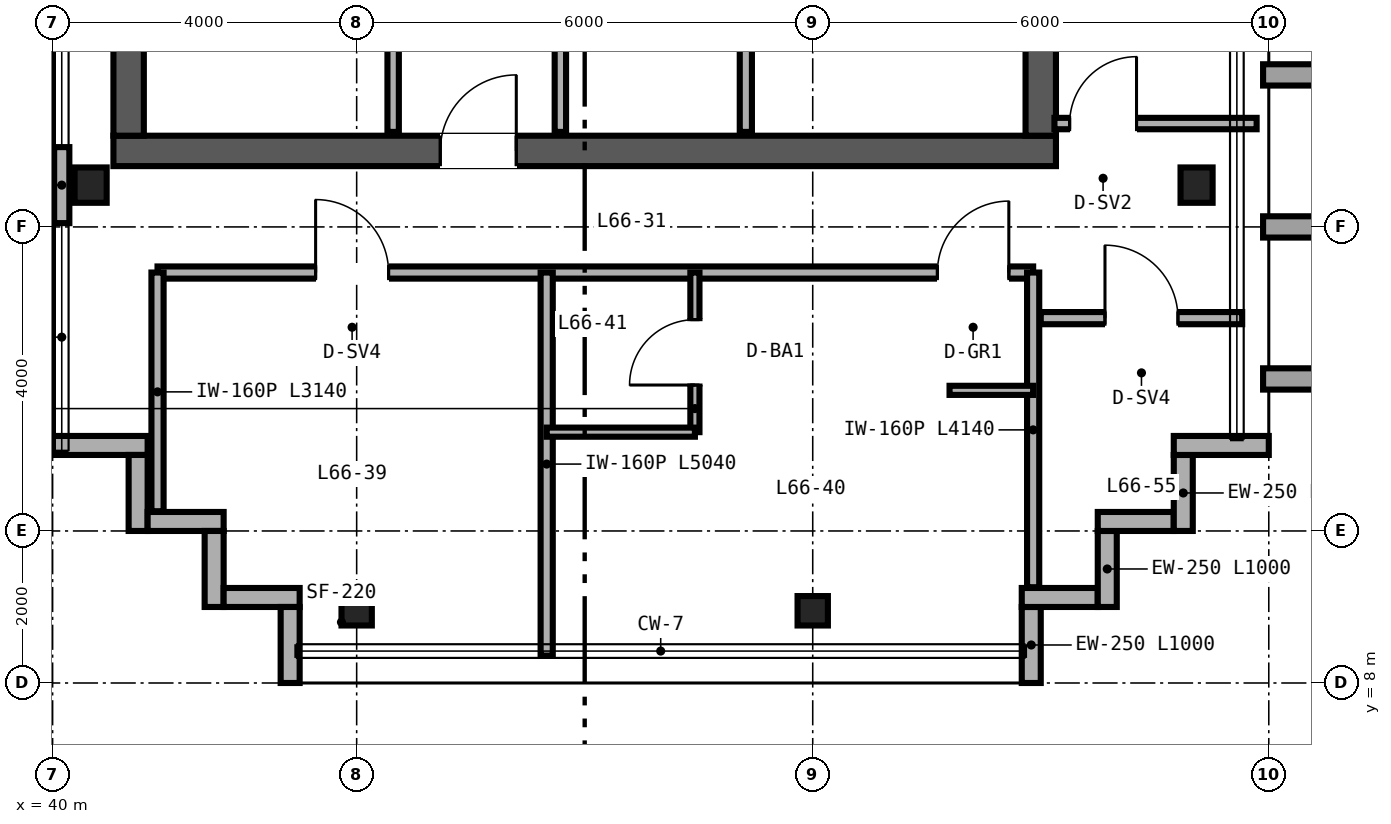
"""IFC4 building model, lengths in metres.
Left out: names, types, materials, properties, quantities, classifications, styles, units other than length and angle.
Written with IfcOpenShell. Run it as: python <this file> out.ifc"""

import sys

from ifc_helpers import new_model, si_unit, direction, frame, frame_2d, origin, origin_2d, place, context, subcontext, project, spatial, rectangle, i_section, extrude, source, transform, mapped, element, fill, save


model = new_model("IFC4")
c1 = context("Model", 3, precision=1e-05, world=origin(), true_north=direction((0.0, 1.0)))
c2 = subcontext(c1, "Body", "Model", "MODEL_VIEW")
j1 = project(units=[si_unit("LENGTHUNIT", "METRE"), si_unit("PLANEANGLEUNIT", "RADIAN")], contexts=[c1])
p1 = place(None, origin())
s1 = spatial("IfcSite", under=j1, at=p1, CompositionType="ELEMENT")
p2 = place(p1, origin())
s2 = spatial("IfcBuilding", under=s1, at=p2, CompositionType="ELEMENT")
p3 = place(p2, frame((0.0, 0.0, 261.6)))
s3 = spatial("IfcBuildingStorey", under=s2, at=p3, CompositionType="ELEMENT", Elevation=261.6)
p4 = place(p3, frame((40.8, 15.0, 0.0), z_axis=(0.0, 0.0, 1.0), x_axis=(1.0, 0.0, 0.0)))
e1 = element("IfcWall", 1, at=p4, inside=s3, PredefinedType="SHEAR", context=c2, shape_type="SweptSolid", body=[
    extrude(rectangle(XDim=12.4, YDim=0.4, at=frame_2d((6.2, 0.0))), origin(), (0.0, 0.0, 1.0), 3.38),
])
p5 = place(p4, frame((4.3, 0.0, 0.0)))
e2 = element("IfcOpeningElement", 2, at=p5, cuts=e1, PredefinedType="OPENING", context=c2, shape_type="SweptSolid", body=[
    extrude(rectangle(XDim=1.0, YDim=2.15, at=frame_2d((0.5, 1.075))), frame((0.0, 0.21, 0.0), z_axis=(0.0, -1.0, 0.0), x_axis=(1.0, 0.0, 0.0)), (0.0, 0.0, 1.0), 0.42),
])
for number, where, z_axis, x_axis in (
    (3, (41.0, 15.2, 0.0), (0.0, 0.0, 1.0), (0.0, 1.0, 0.0)),
    (4, (53.0, 15.2, 0.0), (0.0, 0.0, 1.0), (0.0, 1.0, 0.0)),
):
    element("IfcWall", number, at=place(p3, frame(where, z_axis=z_axis, x_axis=x_axis)), inside=s3, PredefinedType="SHEAR", context=c2, shape_type="SweptSolid", body=[
        extrude(rectangle(XDim=21.6, YDim=0.4, at=frame_2d((10.8, 0.0))), origin(), (0.0, 0.0, 1.0), 3.38),
    ])
m1 = source(origin(), c2, "Body", "SweptSolid", [
    extrude(i_section(OverallWidth=0.422, OverallDepth=0.465, WebThickness=0.045, FlangeThickness=0.073, FilletRadius=0.025, at=origin_2d()), origin(), (0.0, 0.0, 1.0), 3.38),
])
for number, where, z_axis, x_axis in (
    (5, (40.5, 14.55, 0.0), (0.0, 0.0, 1.0), (1.0, 0.0, 0.0)),
    (6, (55.05, 14.55, 0.0), (0.0, 0.0, 1.0), (1.0, 0.0, 0.0)),
):
    element("IfcColumn", number, at=place(p3, frame(where, z_axis=z_axis, x_axis=x_axis)), inside=s3, PredefinedType="COLUMN", context=c2, shape_type="MappedRepresentation", body=[
        mapped(m1, transform((0.0, 0.0, 0.0), scale=1.0)),
    ])
m2 = source(origin(), c2, "Body", "SweptSolid", [
    extrude(i_section(OverallWidth=0.399, OverallDepth=0.387, WebThickness=0.021, FlangeThickness=0.033, FilletRadius=0.025, at=origin_2d()), origin(), (0.0, 0.0, 1.0), 3.38),
])
for number, where, z_axis, x_axis in (
    (7, (44.0, 8.95, 0.0), (0.0, 0.0, 1.0), (1.0, 0.0, 0.0)),
    (8, (50.0, 8.95, 0.0), (0.0, 0.0, 1.0), (1.0, 0.0, 0.0)),
):
    element("IfcColumn", number, at=place(p3, frame(where, z_axis=z_axis, x_axis=x_axis)), inside=s3, PredefinedType="COLUMN", context=c2, shape_type="MappedRepresentation", body=[
        mapped(m2, transform((0.0, 0.0, 0.0), scale=1.0)),
    ])
for number, where, z_axis, x_axis in (
    (9, (52.875, 8.0, 0.0), (0.0, 0.0, 1.0), (0.0, 1.0, 0.0)),
    (10, (52.75, 9.125, 0.0), (0.0, 0.0, 1.0), (1.0, 0.0, 0.0)),
    (11, (53.875, 9.0, 0.0), (0.0, 0.0, 1.0), (0.0, 1.0, 0.0)),
    (12, (53.75, 10.125, 0.0), (0.0, 0.0, 1.0), (1.0, 0.0, 0.0)),
    (13, (54.875, 10.0, 0.0), (0.0, 0.0, 1.0), (0.0, 1.0, 0.0)),
):
    element("IfcWall", number, at=place(p3, frame(where, z_axis=z_axis, x_axis=x_axis)), inside=s3, PredefinedType="SOLIDWALL", context=c2, shape_type="SweptSolid", body=[
        extrude(rectangle(XDim=1.0, YDim=0.25, at=frame_2d((0.5, 0.0))), origin(), (0.0, 0.0, 1.0), 3.38),
    ])
for number, where, z_axis, x_axis in (
    (14, (54.75, 11.125, 0.0), (0.0, 0.0, 1.0), (1.0, 0.0, 0.0)),
    (15, (40.0, 11.125, 0.0), (0.0, 0.0, 1.0), (1.0, 0.0, 0.0)),
):
    element("IfcWall", number, at=place(p3, frame(where, z_axis=z_axis, x_axis=x_axis)), inside=s3, PredefinedType="SOLIDWALL", context=c2, shape_type="SweptSolid", body=[
        extrude(rectangle(XDim=1.25, YDim=0.25, at=frame_2d((0.625, 0.0))), origin(), (0.0, 0.0, 1.0), 3.38),
    ])
for number, where, z_axis, x_axis in (
    (16, (41.125, 11.0, 0.0), (0.0, 0.0, 1.0), (0.0, -1.0, 0.0)),
    (17, (41.25, 10.125, 0.0), (0.0, 0.0, 1.0), (1.0, 0.0, 0.0)),
    (18, (42.125, 10.0, 0.0), (0.0, 0.0, 1.0), (0.0, -1.0, 0.0)),
    (19, (42.25, 9.125, 0.0), (0.0, 0.0, 1.0), (1.0, 0.0, 0.0)),
    (20, (43.125, 9.0, 0.0), (0.0, 0.0, 1.0), (0.0, -1.0, 0.0)),
):
    element("IfcWall", number, at=place(p3, frame(where, z_axis=z_axis, x_axis=x_axis)), inside=s3, PredefinedType="SOLIDWALL", context=c2, shape_type="SweptSolid", body=[
        extrude(rectangle(XDim=1.0, YDim=0.25, at=frame_2d((0.5, 0.0))), origin(), (0.0, 0.0, 1.0), 3.38),
    ])
p6 = place(p3, frame((40.12, 14.05, 0.0), z_axis=(0.0, 0.0, 1.0), x_axis=(0.0, 1.0, 0.0)))
e21 = element("IfcWall", 21, at=p6, inside=s3, PredefinedType="PARAPET", context=c2, shape_type="SweptSolid", body=[
    extrude(rectangle(XDim=1.0, YDim=0.2, at=frame_2d((0.5, 0.0))), origin(), (0.0, 0.0, 1.0), 3.38),
])
p7 = place(p3, frame((46.68, 15.25, 0.0), z_axis=(0.0, 0.0, 1.0), x_axis=(0.0, 1.0, 0.0)))
e22 = element("IfcWall", 22, at=p7, inside=s3, PredefinedType="PARTITIONING", context=c2, shape_type="SweptSolid", body=[
    extrude(rectangle(XDim=16.13, YDim=0.15, at=frame_2d((8.065, 0.0))), origin(), (0.0, 0.0, 1.0), 2.453),
])
p8 = place(p7, frame((3.2, 0.0, 0.0)))
e23 = element("IfcOpeningElement", 23, at=p8, cuts=e22, PredefinedType="OPENING", context=c2, shape_type="SweptSolid", body=[
    extrude(rectangle(XDim=0.88, YDim=2.15, at=frame_2d((0.44, 1.075))), frame((0.0, 0.085, 0.0), z_axis=(0.0, -1.0, 0.0), x_axis=(1.0, 0.0, 0.0)), (0.0, 0.0, 1.0), 0.17),
])
p9 = place(p7, frame((11.2, 0.0, 0.0)))
e24 = element("IfcOpeningElement", 24, at=p9, cuts=e22, PredefinedType="OPENING", context=c2, shape_type="SweptSolid", body=[
    extrude(rectangle(XDim=0.88, YDim=2.15, at=frame_2d((0.44, 1.075))), frame((0.0, 0.085, 0.0), z_axis=(0.0, -1.0, 0.0), x_axis=(1.0, 0.0, 0.0)), (0.0, 0.0, 1.0), 0.17),
])
p10 = place(p3, frame((49.12, 15.25, 0.0), z_axis=(0.0, 0.0, 1.0), x_axis=(0.0, 1.0, 0.0)))
e25 = element("IfcWall", 25, at=p10, inside=s3, PredefinedType="PARTITIONING", context=c2, shape_type="SweptSolid", body=[
    extrude(rectangle(XDim=16.13, YDim=0.16, at=frame_2d((8.065, 0.0))), origin(), (0.0, 0.0, 1.0), 2.453),
])
p11 = place(p10, frame((2.2, 0.0, 0.0)))
e26 = element("IfcOpeningElement", 26, at=p11, cuts=e25, PredefinedType="OPENING", context=c2, shape_type="SweptSolid", body=[
    extrude(rectangle(XDim=0.9, YDim=2.15, at=frame_2d((0.45, 1.075))), frame((0.0, 0.09, 0.0), z_axis=(0.0, -1.0, 0.0), x_axis=(1.0, 0.0, 0.0)), (0.0, 0.0, 1.0), 0.18),
])
p12 = place(p10, frame((8.2, 0.0, 0.0)))
e27 = element("IfcOpeningElement", 27, at=p12, cuts=e25, PredefinedType="OPENING", context=c2, shape_type="SweptSolid", body=[
    extrude(rectangle(XDim=0.9, YDim=2.15, at=frame_2d((0.45, 1.075))), frame((0.0, 0.09, 0.0), z_axis=(0.0, -1.0, 0.0), x_axis=(1.0, 0.0, 0.0)), (0.0, 0.0, 1.0), 0.18),
])
p13 = place(p10, frame((13.5, 0.0, 0.0)))
e28 = element("IfcOpeningElement", 28, at=p13, cuts=e25, PredefinedType="OPENING", context=c2, shape_type="SweptSolid", body=[
    extrude(rectangle(XDim=0.9, YDim=2.15, at=frame_2d((0.45, 1.075))), frame((0.0, 0.09, 0.0), z_axis=(0.0, -1.0, 0.0), x_axis=(1.0, 0.0, 0.0)), (0.0, 0.0, 1.0), 0.18),
])
p14 = place(p3, frame((44.48, 15.25, 0.0), z_axis=(0.0, 0.0, 1.0), x_axis=(0.0, 1.0, 0.0)))
e29 = element("IfcWall", 29, at=p14, inside=s3, PredefinedType="PARTITIONING", context=c2, shape_type="SweptSolid", body=[
    extrude(rectangle(XDim=16.13, YDim=0.15, at=frame_2d((8.065, 0.0))), origin(), (0.0, 0.0, 1.0), 2.453),
])
p15 = place(p14, frame((2.2, 0.0, 0.0)))
e30 = element("IfcOpeningElement", 30, at=p15, cuts=e29, PredefinedType="OPENING", context=c2, shape_type="SweptSolid", body=[
    extrude(rectangle(XDim=0.9, YDim=2.15, at=frame_2d((0.45, 1.075))), frame((0.0, 0.085, 0.0), z_axis=(0.0, -1.0, 0.0), x_axis=(1.0, 0.0, 0.0)), (0.0, 0.0, 1.0), 0.17),
])
p16 = place(p14, frame((10.13, 0.0, 0.0)))
e31 = element("IfcOpeningElement", 31, at=p16, cuts=e29, PredefinedType="OPENING", context=c2, shape_type="SweptSolid", body=[
    extrude(rectangle(XDim=0.9, YDim=2.15, at=frame_2d((0.45, 1.075))), frame((0.0, 0.085, 0.0), z_axis=(0.0, -1.0, 0.0), x_axis=(1.0, 0.0, 0.0)), (0.0, 0.0, 1.0), 0.17),
])
p17 = place(p3, frame((41.38, 13.4, 0.0), z_axis=(0.0, 0.0, 1.0), x_axis=(1.0, 0.0, 0.0)))
e32 = element("IfcWall", 32, at=p17, inside=s3, PredefinedType="PARTITIONING", context=c2, shape_type="SweptSolid", body=[
    extrude(rectangle(XDim=11.52, YDim=0.16, at=frame_2d((5.76, 0.0))), origin(), (0.0, 0.0, 1.0), 3.38),
])
p18 = place(p17, frame((2.08, 0.0, 0.0)))
e33 = element("IfcOpeningElement", 33, at=p18, cuts=e32, PredefinedType="OPENING", context=c2, shape_type="SweptSolid", body=[
    extrude(rectangle(XDim=0.96, YDim=2.15, at=frame_2d((0.48, 1.075))), frame((0.0, 0.09, 0.0), z_axis=(0.0, -1.0, 0.0), x_axis=(1.0, 0.0, 0.0)), (0.0, 0.0, 1.0), 0.18),
])
p19 = place(p17, frame((10.26, 0.0, 0.0)))
e34 = element("IfcOpeningElement", 34, at=p19, cuts=e32, PredefinedType="OPENING", context=c2, shape_type="SweptSolid", body=[
    extrude(rectangle(XDim=0.94, YDim=2.15, at=frame_2d((0.47, 1.075))), frame((0.0, 0.09, 0.0), z_axis=(0.0, -1.0, 0.0), x_axis=(1.0, 0.0, 0.0)), (0.0, 0.0, 1.0), 0.18),
])
p20 = place(p3, frame((41.38, 10.26, 0.0), z_axis=(0.0, 0.0, 1.0), x_axis=(0.0, 1.0, 0.0)))
e35 = element("IfcWall", 35, at=p20, inside=s3, PredefinedType="PARTITIONING", context=c2, shape_type="SweptSolid", body=[
    extrude(rectangle(XDim=3.14, YDim=0.16, at=frame_2d((1.57, 0.0))), origin(), (0.0, 0.0, 1.0), 3.38),
])
p21 = place(p3, frame((52.9, 9.26, 0.0), z_axis=(0.0, 0.0, 1.0), x_axis=(0.0, 1.0, 0.0)))
e36 = element("IfcWall", 36, at=p21, inside=s3, PredefinedType="PARTITIONING", context=c2, shape_type="SweptSolid", body=[
    extrude(rectangle(XDim=4.14, YDim=0.16, at=frame_2d((2.07, 0.0))), origin(), (0.0, 0.0, 1.0), 3.38),
])
p22 = place(p3, frame((46.5, 8.36, 0.0), z_axis=(0.0, 0.0, 1.0), x_axis=(0.0, 1.0, 0.0)))
e37 = element("IfcWall", 37, at=p22, inside=s3, PredefinedType="PARTITIONING", context=c2, shape_type="SweptSolid", body=[
    extrude(rectangle(XDim=5.04, YDim=0.16, at=frame_2d((2.52, 0.0))), origin(), (0.0, 0.0, 1.0), 2.687),
])
p23 = place(p3, frame((48.45, 11.3, 0.0), z_axis=(0.0, 0.0, 1.0), x_axis=(0.0, 1.0, 0.0)))
e38 = element("IfcWall", 38, at=p23, inside=s3, PredefinedType="PARTITIONING", context=c2, shape_type="SweptSolid", body=[
    extrude(rectangle(XDim=2.1, YDim=0.12, at=frame_2d((1.05, 0.0))), origin(), (0.0, 0.0, 1.0), 3.38),
])
p24 = place(p23, frame((0.62, 0.0, 0.0)))
e39 = element("IfcOpeningElement", 39, at=p24, cuts=e38, PredefinedType="OPENING", context=c2, shape_type="SweptSolid", body=[
    extrude(rectangle(XDim=0.86, YDim=2.1, at=frame_2d((0.43, 1.05))), frame((0.0, 0.07, 0.0), z_axis=(0.0, -1.0, 0.0), x_axis=(1.0, 0.0, 0.0)), (0.0, 0.0, 1.0), 0.14),
])
p25 = place(p3, frame((46.5, 11.3, 0.0), z_axis=(0.0, 0.0, 1.0), x_axis=(1.0, 0.0, 0.0)))
e40 = element("IfcWall", 40, at=p25, inside=s3, PredefinedType="PARTITIONING", context=c2, shape_type="SweptSolid", body=[
    extrude(rectangle(XDim=1.95, YDim=0.12, at=frame_2d((0.975, 0.0))), origin(), (0.0, 0.0, 1.0), 3.38),
])
p26 = place(p3, frame((51.8, 11.85, 0.0), z_axis=(0.0, 0.0, 1.0), x_axis=(1.0, 0.0, 0.0)))
e41 = element("IfcWall", 41, at=p26, inside=s3, PredefinedType="PARTITIONING", context=c2, shape_type="SweptSolid", body=[
    extrude(rectangle(XDim=1.1, YDim=0.12, at=frame_2d((0.55, 0.0))), origin(), (0.0, 0.0, 1.0), 3.38),
])
p27 = place(p3, frame((53.18, 15.36, 0.0), z_axis=(0.0, 0.0, 1.0), x_axis=(1.0, 0.0, 0.0)))
e42 = element("IfcWall", 42, at=p27, inside=s3, PredefinedType="PARTITIONING", context=c2, shape_type="SweptSolid", body=[
    extrude(rectangle(XDim=2.66, YDim=0.15, at=frame_2d((1.33, 0.0))), origin(), (0.0, 0.0, 1.0), 2.601),
])
p28 = place(p27, frame((0.2, 0.0, 0.0)))
e43 = element("IfcOpeningElement", 43, at=p28, cuts=e42, PredefinedType="OPENING", context=c2, shape_type="SweptSolid", body=[
    extrude(rectangle(XDim=0.88, YDim=2.15, at=frame_2d((0.44, 1.075))), frame((0.0, 0.085, 0.0), z_axis=(0.0, -1.0, 0.0), x_axis=(1.0, 0.0, 0.0)), (0.0, 0.0, 1.0), 0.17),
])
p29 = place(p3, frame((53.0, 12.8, 0.0), z_axis=(0.0, 0.0, 1.0), x_axis=(1.0, 0.0, 0.0)))
e44 = element("IfcWall", 44, at=p29, inside=s3, PredefinedType="PARTITIONING", context=c2, shape_type="SweptSolid", body=[
    extrude(rectangle(XDim=2.65, YDim=0.16, at=frame_2d((1.325, 0.0))), origin(), (0.0, 0.0, 1.0), 3.38),
])
p30 = place(p29, frame((0.845, 0.0, 0.0)))
e45 = element("IfcOpeningElement", 45, at=p30, cuts=e44, PredefinedType="OPENING", context=c2, shape_type="SweptSolid", body=[
    extrude(rectangle(XDim=0.96, YDim=2.15, at=frame_2d((0.48, 1.075))), frame((0.0, 0.09, 0.0), z_axis=(0.0, -1.0, 0.0), x_axis=(1.0, 0.0, 0.0)), (0.0, 0.0, 1.0), 0.18),
])
m3 = source(origin(), c2, "Body", "SweptSolid", [
    extrude(rectangle(XDim=1.0, YDim=2.15, at=frame_2d((0.5, 1.075))), frame((0.0, 0.025, 0.0), z_axis=(0.0, -1.0, 0.0), x_axis=(1.0, 0.0, 0.0)), (0.0, 0.0, 1.0), 0.05),
])
p31 = place(p5, origin())
e46 = element("IfcDoor", 46, at=p31, inside=s3, OperationType="SINGLE_SWING_RIGHT", PredefinedType="DOOR", context=c2, shape_type="MappedRepresentation", body=[
    mapped(m3, transform((0.0, 0.0, 0.0), scale=1.0)),
])
fill(e2, e46)
m4 = source(origin(), c2, "Body", "SweptSolid", [
    extrude(rectangle(XDim=0.86, YDim=2.1, at=frame_2d((0.43, 1.05))), frame((0.0, 0.025, 0.0), z_axis=(0.0, -1.0, 0.0), x_axis=(1.0, 0.0, 0.0)), (0.0, 0.0, 1.0), 0.05),
])
p32 = place(p24, origin())
e47 = element("IfcDoor", 47, at=p32, inside=s3, OperationType="SINGLE_SWING_LEFT", PredefinedType="DOOR", context=c2, shape_type="MappedRepresentation", body=[
    mapped(m4, transform((0.0, 0.0, 0.0), scale=1.0)),
])
fill(e39, e47)
m5 = source(origin(), c2, "Body", "SweptSolid", [
    extrude(rectangle(XDim=0.96, YDim=2.15, at=frame_2d((0.48, 1.075))), frame((0.0, 0.025, 0.0), z_axis=(0.0, -1.0, 0.0), x_axis=(1.0, 0.0, 0.0)), (0.0, 0.0, 1.0), 0.05),
])
p33 = place(p18, origin())
e48 = element("IfcDoor", 48, at=p33, inside=s3, OperationType="SINGLE_SWING_LEFT", PredefinedType="DOOR", context=c2, shape_type="MappedRepresentation", body=[
    mapped(m5, transform((0.0, 0.0, 0.0), scale=1.0)),
])
fill(e33, e48)
m6 = source(origin(), c2, "Body", "SweptSolid", [
    extrude(rectangle(XDim=0.94, YDim=2.15, at=frame_2d((0.47, 1.075))), frame((0.0, 0.025, 0.0), z_axis=(0.0, -1.0, 0.0), x_axis=(1.0, 0.0, 0.0)), (0.0, 0.0, 1.0), 0.05),
])
p34 = place(p19, origin())
e49 = element("IfcDoor", 49, at=p34, inside=s3, OperationType="SINGLE_SWING_RIGHT", PredefinedType="DOOR", context=c2, shape_type="MappedRepresentation", body=[
    mapped(m6, transform((0.0, 0.0, 0.0), scale=1.0)),
])
fill(e34, e49)
m7 = source(origin(), c2, "Body", "SweptSolid", [
    extrude(rectangle(XDim=0.88, YDim=2.15, at=frame_2d((0.44, 1.075))), frame((0.0, 0.025, 0.0), z_axis=(0.0, -1.0, 0.0), x_axis=(1.0, 0.0, 0.0)), (0.0, 0.0, 1.0), 0.05),
])
p35 = place(p28, origin())
e50 = element("IfcDoor", 50, at=p35, inside=s3, OperationType="SINGLE_SWING_RIGHT", PredefinedType="DOOR", context=c2, shape_type="MappedRepresentation", body=[
    mapped(m7, transform((0.0, 0.0, 0.0), scale=1.0)),
])
fill(e43, e50)
p36 = place(p30, origin())
e51 = element("IfcDoor", 51, at=p36, inside=s3, OperationType="SINGLE_SWING_LEFT", PredefinedType="DOOR", context=c2, shape_type="MappedRepresentation", body=[
    mapped(m5, transform((0.0, 0.0, 0.0), scale=1.0)),
])
fill(e45, e51)
save(model, sys.argv[1])
